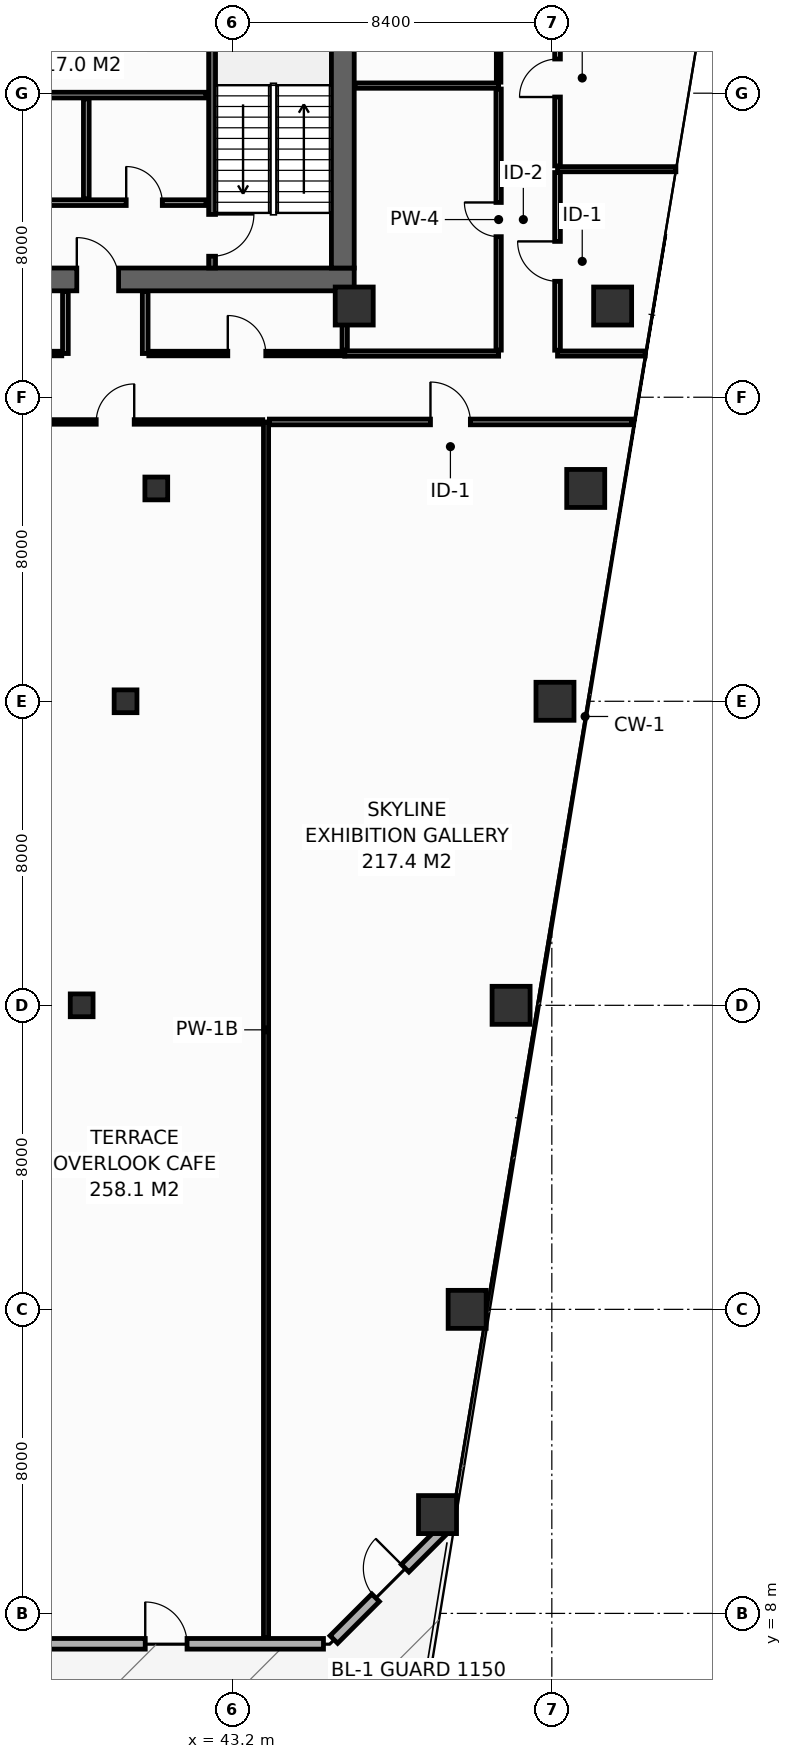
"""IFC4 building model, lengths in metres.
Left out: names, types, materials, properties, quantities, classifications, styles, units other than length and angle.
Written with IfcOpenShell. Run it as: python <this file> out.ifc"""

import sys

from ifc_helpers import new_model, si_unit, direction, frame, frame_2d, origin, origin_2d, place, context, subcontext, project, spatial, rectangle, hollow_rectangle, extrude, element, fill, save


model = new_model("IFC4")
c1 = context("Model", 3, precision=1e-05, world=origin(), true_north=direction((0.0, 1.0)))
c2 = subcontext(c1, "Body", "Model", "MODEL_VIEW")
j1 = project(units=[si_unit("LENGTHUNIT", "METRE"), si_unit("PLANEANGLEUNIT", "RADIAN")], contexts=[c1])
p1 = place(None, origin())
s1 = spatial("IfcSite", under=j1, at=p1, CompositionType="ELEMENT")
p2 = place(p1, origin())
s2 = spatial("IfcBuilding", under=s1, at=p2, CompositionType="ELEMENT")
p3 = place(p2, frame((0.0, 0.0, 101.6)))
s3 = spatial("IfcBuildingStorey", under=s2, at=p3, CompositionType="ELEMENT", Elevation=101.6)
p4 = place(p3, frame((13.5, 43.1, 0.0), z_axis=(0.0, 0.0, 1.0), x_axis=(1.0, 0.0, 0.0)))
e1 = element("IfcWall", 1, at=p4, inside=s3, PredefinedType="SHEAR", context=c2, shape_type="SweptSolid", body=[
    extrude(rectangle(XDim=32.9, YDim=0.6, at=frame_2d((16.45, 0.0))), origin(), (0.0, 0.0, 1.0), 4.15),
])
p5 = place(p4, frame((5.4, 0.0, 0.0)))
e2 = element("IfcOpeningElement", 2, at=p5, cuts=e1, PredefinedType="OPENING", context=c2, shape_type="SweptSolid", body=[
    extrude(rectangle(XDim=1.1, YDim=2.15, at=frame_2d((0.55, 1.075))), frame((0.0, 0.31, 0.0), z_axis=(0.0, -1.0, 0.0), x_axis=(1.0, 0.0, 0.0)), (0.0, 0.0, 1.0), 0.62),
])
p6 = place(p4, frame((25.6, 0.0, 0.0)))
e3 = element("IfcOpeningElement", 3, at=p6, cuts=e1, PredefinedType="OPENING", context=c2, shape_type="SweptSolid", body=[
    extrude(rectangle(XDim=1.1, YDim=2.15, at=frame_2d((0.55, 1.075))), frame((0.0, 0.31, 0.0), z_axis=(0.0, -1.0, 0.0), x_axis=(1.0, 0.0, 0.0)), (0.0, 0.0, 1.0), 0.62),
])
p7 = place(p3, frame((46.1, 43.4, 0.0), z_axis=(0.0, 0.0, 1.0), x_axis=(0.0, 1.0, 0.0)))
e4 = element("IfcWall", 4, at=p7, inside=s3, PredefinedType="SHEAR", context=c2, shape_type="SweptSolid", body=[
    extrude(rectangle(XDim=10.4, YDim=0.6, at=frame_2d((5.2, 0.0))), origin(), (0.0, 0.0, 1.0), 4.15),
])
for number, where, z_axis, x_axis in (
    (5, (46.4, 42.4, 0.0), (0.0, 0.0, 1.0), (1.0, 0.0, 0.0)),
    (6, (53.2, 42.4, 0.0), (0.0, 0.0, 1.0), (1.0, 0.0, 0.0)),
    (7, (48.592, 10.6, 0.0), (0.0, 0.0, 1.0), (1.0, 0.0, 0.0)),
    (8, (49.372, 16.0, 0.0), (0.0, 0.0, 1.0), (1.0, 0.0, 0.0)),
    (9, (50.528, 24.0, 0.0), (0.0, 0.0, 1.0), (1.0, 0.0, 0.0)),
):
    element("IfcColumn", number, at=place(p3, frame(where, z_axis=z_axis, x_axis=x_axis)), inside=s3, PredefinedType="COLUMN", context=c2, shape_type="SweptSolid", body=[
        extrude(hollow_rectangle(XDim=1.0, YDim=1.0, WallThickness=0.045, at=origin_2d()), origin(), (0.0, 0.0, 1.0), 4.4),
    ])
p8 = place(p3, frame((39.228, 24.0, 0.0), z_axis=(0.0, 0.0, 1.0), x_axis=(1.0, 0.0, 0.0)))
e10 = element("IfcColumn", 10, at=p8, inside=s3, PredefinedType="COLUMN", context=c2, shape_type="SweptSolid", body=[
    extrude(hollow_rectangle(XDim=0.6, YDim=0.6, WallThickness=0.028, at=origin_2d()), origin(), (0.0, 0.0, 1.0), 4.4),
])
p9 = place(p3, frame((51.683, 32.0, 0.0), z_axis=(0.0, 0.0, 1.0), x_axis=(1.0, 0.0, 0.0)))
e11 = element("IfcColumn", 11, at=p9, inside=s3, PredefinedType="COLUMN", context=c2, shape_type="SweptSolid", body=[
    extrude(hollow_rectangle(XDim=1.0, YDim=1.0, WallThickness=0.045, at=origin_2d()), origin(), (0.0, 0.0, 1.0), 4.4),
])
p10 = place(p3, frame((40.383, 32.0, 0.0), z_axis=(0.0, 0.0, 1.0), x_axis=(1.0, 0.0, 0.0)))
e12 = element("IfcColumn", 12, at=p10, inside=s3, PredefinedType="COLUMN", context=c2, shape_type="SweptSolid", body=[
    extrude(hollow_rectangle(XDim=0.6, YDim=0.6, WallThickness=0.028, at=origin_2d()), origin(), (0.0, 0.0, 1.0), 4.4),
])
p11 = place(p3, frame((52.492, 37.6, 0.0), z_axis=(0.0, 0.0, 1.0), x_axis=(1.0, 0.0, 0.0)))
e13 = element("IfcColumn", 13, at=p11, inside=s3, PredefinedType="COLUMN", context=c2, shape_type="SweptSolid", body=[
    extrude(hollow_rectangle(XDim=1.0, YDim=1.0, WallThickness=0.045, at=origin_2d()), origin(), (0.0, 0.0, 1.0), 4.4),
])
p12 = place(p3, frame((41.192, 37.6, 0.0), z_axis=(0.0, 0.0, 1.0), x_axis=(1.0, 0.0, 0.0)))
e14 = element("IfcColumn", 14, at=p12, inside=s3, PredefinedType="COLUMN", context=c2, shape_type="SweptSolid", body=[
    extrude(hollow_rectangle(XDim=0.6, YDim=0.6, WallThickness=0.028, at=origin_2d()), origin(), (0.0, 0.0, 1.0), 4.4),
])
p13 = place(p3, frame((42.66, 53.8, 0.0), z_axis=(0.0, 0.0, 1.0), x_axis=(0.0, -1.0, 0.0)))
e15 = element("IfcWall", 15, at=p13, inside=s3, PredefinedType="SHEAR", context=c2, shape_type="SweptSolid", body=[
    extrude(rectangle(XDim=10.4, YDim=0.18, at=frame_2d((5.2, 0.0))), origin(), (0.0, 0.0, 1.0), 4.15),
])
p14 = place(p13, frame((8.99, 0.0, 0.0)))
e16 = element("IfcOpeningElement", 16, at=p14, cuts=e15, PredefinedType="OPENING", context=c2, shape_type="SweptSolid", body=[
    extrude(rectangle(XDim=1.1, YDim=2.15, at=frame_2d((0.55, 1.075))), frame((0.0, 0.1, 0.0), z_axis=(0.0, -1.0, 0.0), x_axis=(1.0, 0.0, 0.0)), (0.0, 0.0, 1.0), 0.2),
])
p15 = place(p3, frame((36.15, 45.12, 0.0), z_axis=(0.0, 0.0, 1.0), x_axis=(1.0, 0.0, 0.0)))
e17 = element("IfcWall", 17, at=p15, inside=s3, PredefinedType="PARTITIONING", context=c2, shape_type="SweptSolid", body=[
    extrude(rectangle(XDim=6.35, YDim=0.15, at=frame_2d((3.175, 0.0))), origin(), (0.0, 0.0, 1.0), 4.15),
])
p16 = place(p15, frame((1.05, 0.0, 0.0)))
e18 = element("IfcOpeningElement", 18, at=p16, cuts=e17, PredefinedType="OPENING", context=c2, shape_type="SweptSolid", body=[
    extrude(rectangle(XDim=0.95, YDim=2.15, at=frame_2d((0.475, 1.075))), frame((0.0, 0.085, 0.0), z_axis=(0.0, -1.0, 0.0), x_axis=(1.0, 0.0, 0.0)), (0.0, 0.0, 1.0), 0.17),
])
p17 = place(p15, frame((4.25, 0.0, 0.0)))
e19 = element("IfcOpeningElement", 19, at=p17, cuts=e17, PredefinedType="OPENING", context=c2, shape_type="SweptSolid", body=[
    extrude(rectangle(XDim=0.95, YDim=2.15, at=frame_2d((0.475, 1.075))), frame((0.0, 0.085, 0.0), z_axis=(0.0, -1.0, 0.0), x_axis=(1.0, 0.0, 0.0)), (0.0, 0.0, 1.0), 0.17),
])
p18 = place(p3, frame((36.15, 47.95, 0.0), z_axis=(0.0, 0.0, 1.0), x_axis=(1.0, 0.0, 0.0)))
e20 = element("IfcWall", 20, at=p18, inside=s3, PredefinedType="PARTITIONING", context=c2, shape_type="SweptSolid", body=[
    extrude(rectangle(XDim=6.35, YDim=0.15, at=frame_2d((3.175, 0.0))), origin(), (0.0, 0.0, 1.0), 4.15),
])
p19 = place(p3, frame((39.35, 45.22, 0.0), z_axis=(0.0, 0.0, 1.0), x_axis=(0.0, 1.0, 0.0)))
e21 = element("IfcWall", 21, at=p19, inside=s3, PredefinedType="PARTITIONING", context=c2, shape_type="SweptSolid", body=[
    extrude(rectangle(XDim=2.63, YDim=0.15, at=frame_2d((1.315, 0.0))), origin(), (0.0, 0.0, 1.0), 4.15),
])
p20 = place(p3, frame((37.311, 7.2, 0.0), z_axis=(0.0, 0.0, 1.0), x_axis=(1.0, 0.0, 0.0)))
e22 = element("IfcWall", 22, at=p20, inside=s3, PredefinedType="STANDARD", context=c2, shape_type="SweptSolid", body=[
    extrude(rectangle(XDim=8.28, YDim=0.28, at=frame_2d((4.14, 0.0))), origin(), (0.0, 0.0, 1.0), 4.15),
])
p21 = place(p20, frame((3.59, 0.0, 0.0)))
e23 = element("IfcOpeningElement", 23, at=p21, cuts=e22, PredefinedType="OPENING", context=c2, shape_type="SweptSolid", body=[
    extrude(rectangle(XDim=1.1, YDim=2.2, at=frame_2d((0.55, 1.1))), frame((0.0, 0.15, 0.0), z_axis=(0.0, -1.0, 0.0), x_axis=(1.0, 0.0, 0.0)), (0.0, 0.0, 1.0), 0.3),
])
p22 = place(p3, frame((45.864, 7.313, 0.0), z_axis=(0.0, 0.0, 1.0), x_axis=(0.70707775441, 0.707135806771, 0.0)))
e24 = element("IfcWall", 24, at=p22, inside=s3, PredefinedType="STANDARD", context=c2, shape_type="SweptSolid", body=[
    extrude(rectangle(XDim=4.206, YDim=0.28, at=frame_2d((2.103, 0.0))), origin(), (0.0, 0.0, 1.0), 4.15),
])
p23 = place(p22, frame((1.553, 0.0, 0.0)))
e25 = element("IfcOpeningElement", 25, at=p23, cuts=e24, PredefinedType="OPENING", context=c2, shape_type="SweptSolid", body=[
    extrude(rectangle(XDim=1.1, YDim=2.2, at=frame_2d((0.55, 1.1))), frame((0.0, 0.15, 0.0), z_axis=(0.0, -1.0, 0.0), x_axis=(1.0, 0.0, 0.0)), (0.0, 0.0, 1.0), 0.3),
])
p24 = place(p3, frame((46.15, 41.15, 0.0), z_axis=(0.0, 0.0, 1.0), x_axis=(1.0, 0.0, 0.0)))
e26 = element("IfcWall", 26, at=p24, inside=s3, PredefinedType="PARTITIONING", context=c2, shape_type="SweptSolid", body=[
    extrude(rectangle(XDim=4.05, YDim=0.14, at=frame_2d((2.025, 0.0))), origin(), (0.0, 0.0, 1.0), 4.15),
])
p25 = place(p3, frame((46.15, 41.24, 0.0), z_axis=(0.0, 0.0, 1.0), x_axis=(0.0, 1.0, 0.0)))
e27 = element("IfcWall", 27, at=p25, inside=s3, PredefinedType="PARTITIONING", context=c2, shape_type="SweptSolid", body=[
    extrude(rectangle(XDim=1.54, YDim=0.14, at=frame_2d((0.77, 0.0))), origin(), (0.0, 0.0, 1.0), 4.15),
])
p26 = place(p3, frame((46.42, 48.2, 0.0), z_axis=(0.0, 0.0, 1.0), x_axis=(1.0, 0.0, 0.0)))
e28 = element("IfcWall", 28, at=p26, inside=s3, PredefinedType="PARTITIONING", context=c2, shape_type="SweptSolid", body=[
    extrude(rectangle(XDim=3.78, YDim=0.14, at=frame_2d((1.89, 0.0))), origin(), (0.0, 0.0, 1.0), 4.15),
])
p27 = place(p3, frame((50.2, 41.24, 0.0), z_axis=(0.0, 0.0, 1.0), x_axis=(0.0, 1.0, 0.0)))
e29 = element("IfcWall", 29, at=p27, inside=s3, PredefinedType="PARTITIONING", context=c2, shape_type="SweptSolid", body=[
    extrude(rectangle(XDim=6.87, YDim=0.14, at=frame_2d((3.435, 0.0))), origin(), (0.0, 0.0, 1.0), 3.335),
])
p28 = place(p27, frame((2.985, 0.0, 0.0)))
e30 = element("IfcOpeningElement", 30, at=p28, cuts=e29, PredefinedType="OPENING", context=c2, shape_type="SweptSolid", body=[
    extrude(rectangle(XDim=0.9, YDim=2.1, at=frame_2d((0.45, 1.05))), frame((0.0, 0.08, 0.0), z_axis=(0.0, -1.0, 0.0), x_axis=(1.0, 0.0, 0.0)), (0.0, 0.0, 1.0), 0.16),
])
p29 = place(p3, frame((50.2, 48.29, 0.0), z_axis=(0.0, 0.0, 1.0), x_axis=(0.0, 1.0, 0.0)))
e31 = element("IfcWall", 31, at=p29, inside=s3, PredefinedType="PARTITIONING", context=c2, shape_type="SweptSolid", body=[
    extrude(rectangle(XDim=7.705, YDim=0.12, at=frame_2d((3.853, 0.0))), origin(), (0.0, 0.0, 1.0), 3.435),
])
p30 = place(p29, frame((3.352, 0.0, 0.0)))
e32 = element("IfcOpeningElement", 32, at=p30, cuts=e31, PredefinedType="OPENING", context=c2, shape_type="SweptSolid", body=[
    extrude(rectangle(XDim=1.0, YDim=2.15, at=frame_2d((0.5, 1.075))), frame((0.0, 0.07, 0.0), z_axis=(0.0, -1.0, 0.0), x_axis=(1.0, 0.0, 0.0)), (0.0, 0.0, 1.0), 0.14),
])
p31 = place(p3, frame((51.75, 41.15, 0.0), z_axis=(0.0, 0.0, 1.0), x_axis=(1.0, 0.0, 0.0)))
e33 = element("IfcWall", 33, at=p31, inside=s3, PredefinedType="PARTITIONING", context=c2, shape_type="SweptSolid", body=[
    extrude(rectangle(XDim=2.308, YDim=0.135, at=frame_2d((1.154, 0.0))), origin(), (0.0, 0.0, 1.0), 3.635),
])
p32 = place(p3, frame((51.75, 46.0, 0.0), z_axis=(0.0, 0.0, 1.0), x_axis=(1.0, 0.0, 0.0)))
e34 = element("IfcWall", 34, at=p32, inside=s3, PredefinedType="PARTITIONING", context=c2, shape_type="SweptSolid", body=[
    extrude(rectangle(XDim=3.115, YDim=0.135, at=frame_2d((1.557, 0.0))), origin(), (0.0, 0.0, 1.0), 3.335),
])
p33 = place(p3, frame((51.75, 41.238, 0.0), z_axis=(0.0, 0.0, 1.0), x_axis=(0.0, 1.0, 0.0)))
e35 = element("IfcWall", 35, at=p33, inside=s3, PredefinedType="PARTITIONING", context=c2, shape_type="SweptSolid", body=[
    extrude(rectangle(XDim=4.675, YDim=0.15, at=frame_2d((2.337, 0.0))), origin(), (0.0, 0.0, 1.0), 3.335),
])
p34 = place(p33, frame((1.813, 0.0, 0.0)))
e36 = element("IfcOpeningElement", 36, at=p34, cuts=e35, PredefinedType="OPENING", context=c2, shape_type="SweptSolid", body=[
    extrude(rectangle(XDim=1.05, YDim=2.15, at=frame_2d((0.525, 1.075))), frame((0.0, 0.085, 0.0), z_axis=(0.0, -1.0, 0.0), x_axis=(1.0, 0.0, 0.0)), (0.0, 0.0, 1.0), 0.17),
])
p35 = place(p3, frame((51.75, 46.087, 0.0), z_axis=(0.0, 0.0, 1.0), x_axis=(0.0, 1.0, 0.0)))
e37 = element("IfcWall", 37, at=p35, inside=s3, PredefinedType="PARTITIONING", context=c2, shape_type="SweptSolid", body=[
    extrude(rectangle(XDim=4.625, YDim=0.15, at=frame_2d((2.312, 0.0))), origin(), (0.0, 0.0, 1.0), 4.15),
])
p36 = place(p35, frame((1.812, 0.0, 0.0)))
e38 = element("IfcOpeningElement", 38, at=p36, cuts=e37, PredefinedType="OPENING", context=c2, shape_type="SweptSolid", body=[
    extrude(rectangle(XDim=1.0, YDim=2.15, at=frame_2d((0.5, 1.075))), frame((0.0, 0.085, 0.0), z_axis=(0.0, -1.0, 0.0), x_axis=(1.0, 0.0, 0.0)), (0.0, 0.0, 1.0), 0.17),
])
for number, where, z_axis, x_axis in (
    (39, (38.8, 41.15, 0.0), (0.0, 0.0, 1.0), (0.0, 1.0, 0.0)),
    (40, (40.9, 41.15, 0.0), (0.0, 0.0, 1.0), (0.0, 1.0, 0.0)),
):
    element("IfcWall", number, at=place(p3, frame(where, z_axis=z_axis, x_axis=x_axis)), inside=s3, PredefinedType="PARTITIONING", context=c2, shape_type="SweptSolid", body=[
        extrude(rectangle(XDim=1.63, YDim=0.15, at=frame_2d((0.815, 0.0))), origin(), (0.0, 0.0, 1.0), 4.15),
    ])
p37 = place(p3, frame((20.795, 41.15, 0.0), z_axis=(0.0, 0.0, 1.0), x_axis=(1.0, 0.0, 0.0)))
e41 = element("IfcWall", 41, at=p37, inside=s3, PredefinedType="PARTITIONING", context=c2, shape_type="SweptSolid", body=[
    extrude(rectangle(XDim=17.91, YDim=0.12, at=frame_2d((8.955, 0.0))), origin(), (0.0, 0.0, 1.0), 3.335),
])
p38 = place(p37, frame((8.455, 0.0, 0.0)))
e42 = element("IfcOpeningElement", 42, at=p38, cuts=e41, PredefinedType="OPENING", context=c2, shape_type="SweptSolid", body=[
    extrude(rectangle(XDim=1.0, YDim=2.15, at=frame_2d((0.5, 1.075))), frame((0.0, 0.07, 0.0), z_axis=(0.0, -1.0, 0.0), x_axis=(1.0, 0.0, 0.0)), (0.0, 0.0, 1.0), 0.14),
])
p39 = place(p3, frame((40.995, 41.15, 0.0), z_axis=(0.0, 0.0, 1.0), x_axis=(1.0, 0.0, 0.0)))
e43 = element("IfcWall", 43, at=p39, inside=s3, PredefinedType="PARTITIONING", context=c2, shape_type="SweptSolid", body=[
    extrude(rectangle(XDim=5.155, YDim=0.12, at=frame_2d((2.577, 0.0))), origin(), (0.0, 0.0, 1.0), 4.15),
])
p40 = place(p39, frame((2.078, 0.0, 0.0)))
e44 = element("IfcOpeningElement", 44, at=p40, cuts=e43, PredefinedType="OPENING", context=c2, shape_type="SweptSolid", body=[
    extrude(rectangle(XDim=1.0, YDim=2.15, at=frame_2d((0.5, 1.075))), frame((0.0, 0.07, 0.0), z_axis=(0.0, -1.0, 0.0), x_axis=(1.0, 0.0, 0.0)), (0.0, 0.0, 1.0), 0.14),
])
p41 = place(p3, frame((44.08, 7.36, 0.0), z_axis=(0.0, 0.0, 1.0), x_axis=(0.0, 1.0, 0.0)))
e45 = element("IfcWall", 45, at=p41, inside=s3, PredefinedType="PARTITIONING", context=c2, shape_type="SweptSolid", body=[
    extrude(rectangle(XDim=31.99, YDim=0.135, at=frame_2d((15.995, 0.0))), origin(), (0.0, 0.0, 1.0), 3.335),
])
p42 = place(p3, frame((36.23, 39.35, 0.0), z_axis=(0.0, 0.0, 1.0), x_axis=(1.0, 0.0, 0.0)))
e46 = element("IfcWall", 46, at=p42, inside=s3, PredefinedType="PARTITIONING", context=c2, shape_type="SweptSolid", body=[
    extrude(rectangle(XDim=7.762, YDim=0.12, at=frame_2d((3.881, 0.0))), origin(), (0.0, 0.0, 1.0), 3.335),
])
p43 = place(p42, frame((3.381, 0.0, 0.0)))
e47 = element("IfcOpeningElement", 47, at=p43, cuts=e46, PredefinedType="OPENING", context=c2, shape_type="SweptSolid", body=[
    extrude(rectangle(XDim=1.0, YDim=2.15, at=frame_2d((0.5, 1.075))), frame((0.0, 0.07, 0.0), z_axis=(0.0, -1.0, 0.0), x_axis=(1.0, 0.0, 0.0)), (0.0, 0.0, 1.0), 0.14),
])
p44 = place(p3, frame((44.167, 39.35, 0.0), z_axis=(0.0, 0.0, 1.0), x_axis=(1.0, 0.0, 0.0)))
e48 = element("IfcWall", 48, at=p44, inside=s3, PredefinedType="PARTITIONING", context=c2, shape_type="SweptSolid", body=[
    extrude(rectangle(XDim=9.528, YDim=0.15, at=frame_2d((4.764, 0.0))), origin(), (0.0, 0.0, 1.0), 3.635),
])
p45 = place(p44, frame((4.239, 0.0, 0.0)))
e49 = element("IfcOpeningElement", 49, at=p45, cuts=e48, PredefinedType="OPENING", context=c2, shape_type="SweptSolid", body=[
    extrude(rectangle(XDim=1.05, YDim=2.15, at=frame_2d((0.525, 1.075))), frame((0.0, 0.085, 0.0), z_axis=(0.0, -1.0, 0.0), x_axis=(1.0, 0.0, 0.0)), (0.0, 0.0, 1.0), 0.17),
])
p46 = place(p14, origin())
e50 = element("IfcDoor", 50, at=p46, inside=s3, OperationType="SINGLE_SWING_LEFT", PredefinedType="DOOR", context=c2, shape_type="SweptSolid", body=[
    extrude(rectangle(XDim=1.1, YDim=2.15, at=frame_2d((0.55, 1.075))), frame((0.0, 0.025, 0.0), z_axis=(0.0, -1.0, 0.0), x_axis=(1.0, 0.0, 0.0)), (0.0, 0.0, 1.0), 0.05),
])
fill(e16, e50)
p47 = place(p6, origin())
e51 = element("IfcDoor", 51, at=p47, inside=s3, OperationType="SINGLE_SWING_LEFT", PredefinedType="DOOR", context=c2, shape_type="SweptSolid", body=[
    extrude(rectangle(XDim=1.1, YDim=2.15, at=frame_2d((0.55, 1.075))), frame((0.0, 0.025, 0.0), z_axis=(0.0, -1.0, 0.0), x_axis=(1.0, 0.0, 0.0)), (0.0, 0.0, 1.0), 0.05),
])
fill(e3, e51)
p48 = place(p17, origin())
e52 = element("IfcDoor", 52, at=p48, inside=s3, OperationType="SINGLE_SWING_LEFT", PredefinedType="DOOR", context=c2, shape_type="SweptSolid", body=[
    extrude(rectangle(XDim=0.95, YDim=2.15, at=frame_2d((0.475, 1.075))), frame((0.0, 0.025, 0.0), z_axis=(0.0, -1.0, 0.0), x_axis=(1.0, 0.0, 0.0)), (0.0, 0.0, 1.0), 0.05),
])
fill(e19, e52)
p49 = place(p21, origin())
e53 = element("IfcDoor", 53, at=p49, inside=s3, OperationType="SINGLE_SWING_LEFT", PredefinedType="DOOR", context=c2, shape_type="SweptSolid", body=[
    extrude(rectangle(XDim=1.1, YDim=2.2, at=frame_2d((0.55, 1.1))), frame((0.0, 0.025, 0.0), z_axis=(0.0, -1.0, 0.0), x_axis=(1.0, 0.0, 0.0)), (0.0, 0.0, 1.0), 0.05),
])
fill(e23, e53)
p50 = place(p23, origin())
e54 = element("IfcDoor", 54, at=p50, inside=s3, OperationType="SINGLE_SWING_RIGHT", PredefinedType="DOOR", context=c2, shape_type="SweptSolid", body=[
    extrude(rectangle(XDim=1.1, YDim=2.2, at=frame_2d((0.55, 1.1))), frame((0.0, 0.025, 0.0), z_axis=(0.0, -1.0, 0.0), x_axis=(1.0, 0.0, 0.0)), (0.0, 0.0, 1.0), 0.05),
])
fill(e25, e54)
p51 = place(p28, origin())
e55 = element("IfcDoor", 55, at=p51, inside=s3, OperationType="SINGLE_SWING_RIGHT", PredefinedType="DOOR", context=c2, shape_type="SweptSolid", body=[
    extrude(rectangle(XDim=0.9, YDim=2.1, at=frame_2d((0.45, 1.05))), frame((0.0, 0.025, 0.0), z_axis=(0.0, -1.0, 0.0), x_axis=(1.0, 0.0, 0.0)), (0.0, 0.0, 1.0), 0.05),
])
fill(e30, e55)
p52 = place(p34, origin())
e56 = element("IfcDoor", 56, at=p52, inside=s3, OperationType="SINGLE_SWING_RIGHT", PredefinedType="DOOR", context=c2, shape_type="SweptSolid", body=[
    extrude(rectangle(XDim=1.05, YDim=2.15, at=frame_2d((0.525, 1.075))), frame((0.0, 0.025, 0.0), z_axis=(0.0, -1.0, 0.0), x_axis=(1.0, 0.0, 0.0)), (0.0, 0.0, 1.0), 0.05),
])
fill(e36, e56)
p53 = place(p36, origin())
e57 = element("IfcDoor", 57, at=p53, inside=s3, OperationType="SINGLE_SWING_LEFT", PredefinedType="DOOR", context=c2, shape_type="SweptSolid", body=[
    extrude(rectangle(XDim=1.0, YDim=2.15, at=frame_2d((0.5, 1.075))), frame((0.0, 0.025, 0.0), z_axis=(0.0, -1.0, 0.0), x_axis=(1.0, 0.0, 0.0)), (0.0, 0.0, 1.0), 0.05),
])
fill(e38, e57)
p54 = place(p40, origin())
e58 = element("IfcDoor", 58, at=p54, inside=s3, OperationType="SINGLE_SWING_LEFT", PredefinedType="DOOR", context=c2, shape_type="SweptSolid", body=[
    extrude(rectangle(XDim=1.0, YDim=2.15, at=frame_2d((0.5, 1.075))), frame((0.0, 0.025, 0.0), z_axis=(0.0, -1.0, 0.0), x_axis=(1.0, 0.0, 0.0)), (0.0, 0.0, 1.0), 0.05),
])
fill(e44, e58)
p55 = place(p43, origin())
e59 = element("IfcDoor", 59, at=p55, inside=s3, OperationType="SINGLE_SWING_RIGHT", PredefinedType="DOOR", context=c2, shape_type="SweptSolid", body=[
    extrude(rectangle(XDim=1.0, YDim=2.15, at=frame_2d((0.5, 1.075))), frame((0.0, 0.025, 0.0), z_axis=(0.0, -1.0, 0.0), x_axis=(1.0, 0.0, 0.0)), (0.0, 0.0, 1.0), 0.05),
])
fill(e47, e59)
p56 = place(p45, origin())
e60 = element("IfcDoor", 60, at=p56, inside=s3, OperationType="SINGLE_SWING_LEFT", PredefinedType="DOOR", context=c2, shape_type="SweptSolid", body=[
    extrude(rectangle(XDim=1.05, YDim=2.15, at=frame_2d((0.525, 1.075))), frame((0.0, 0.025, 0.0), z_axis=(0.0, -1.0, 0.0), x_axis=(1.0, 0.0, 0.0)), (0.0, 0.0, 1.0), 0.05),
])
fill(e49, e60)
save(model, sys.argv[1])
